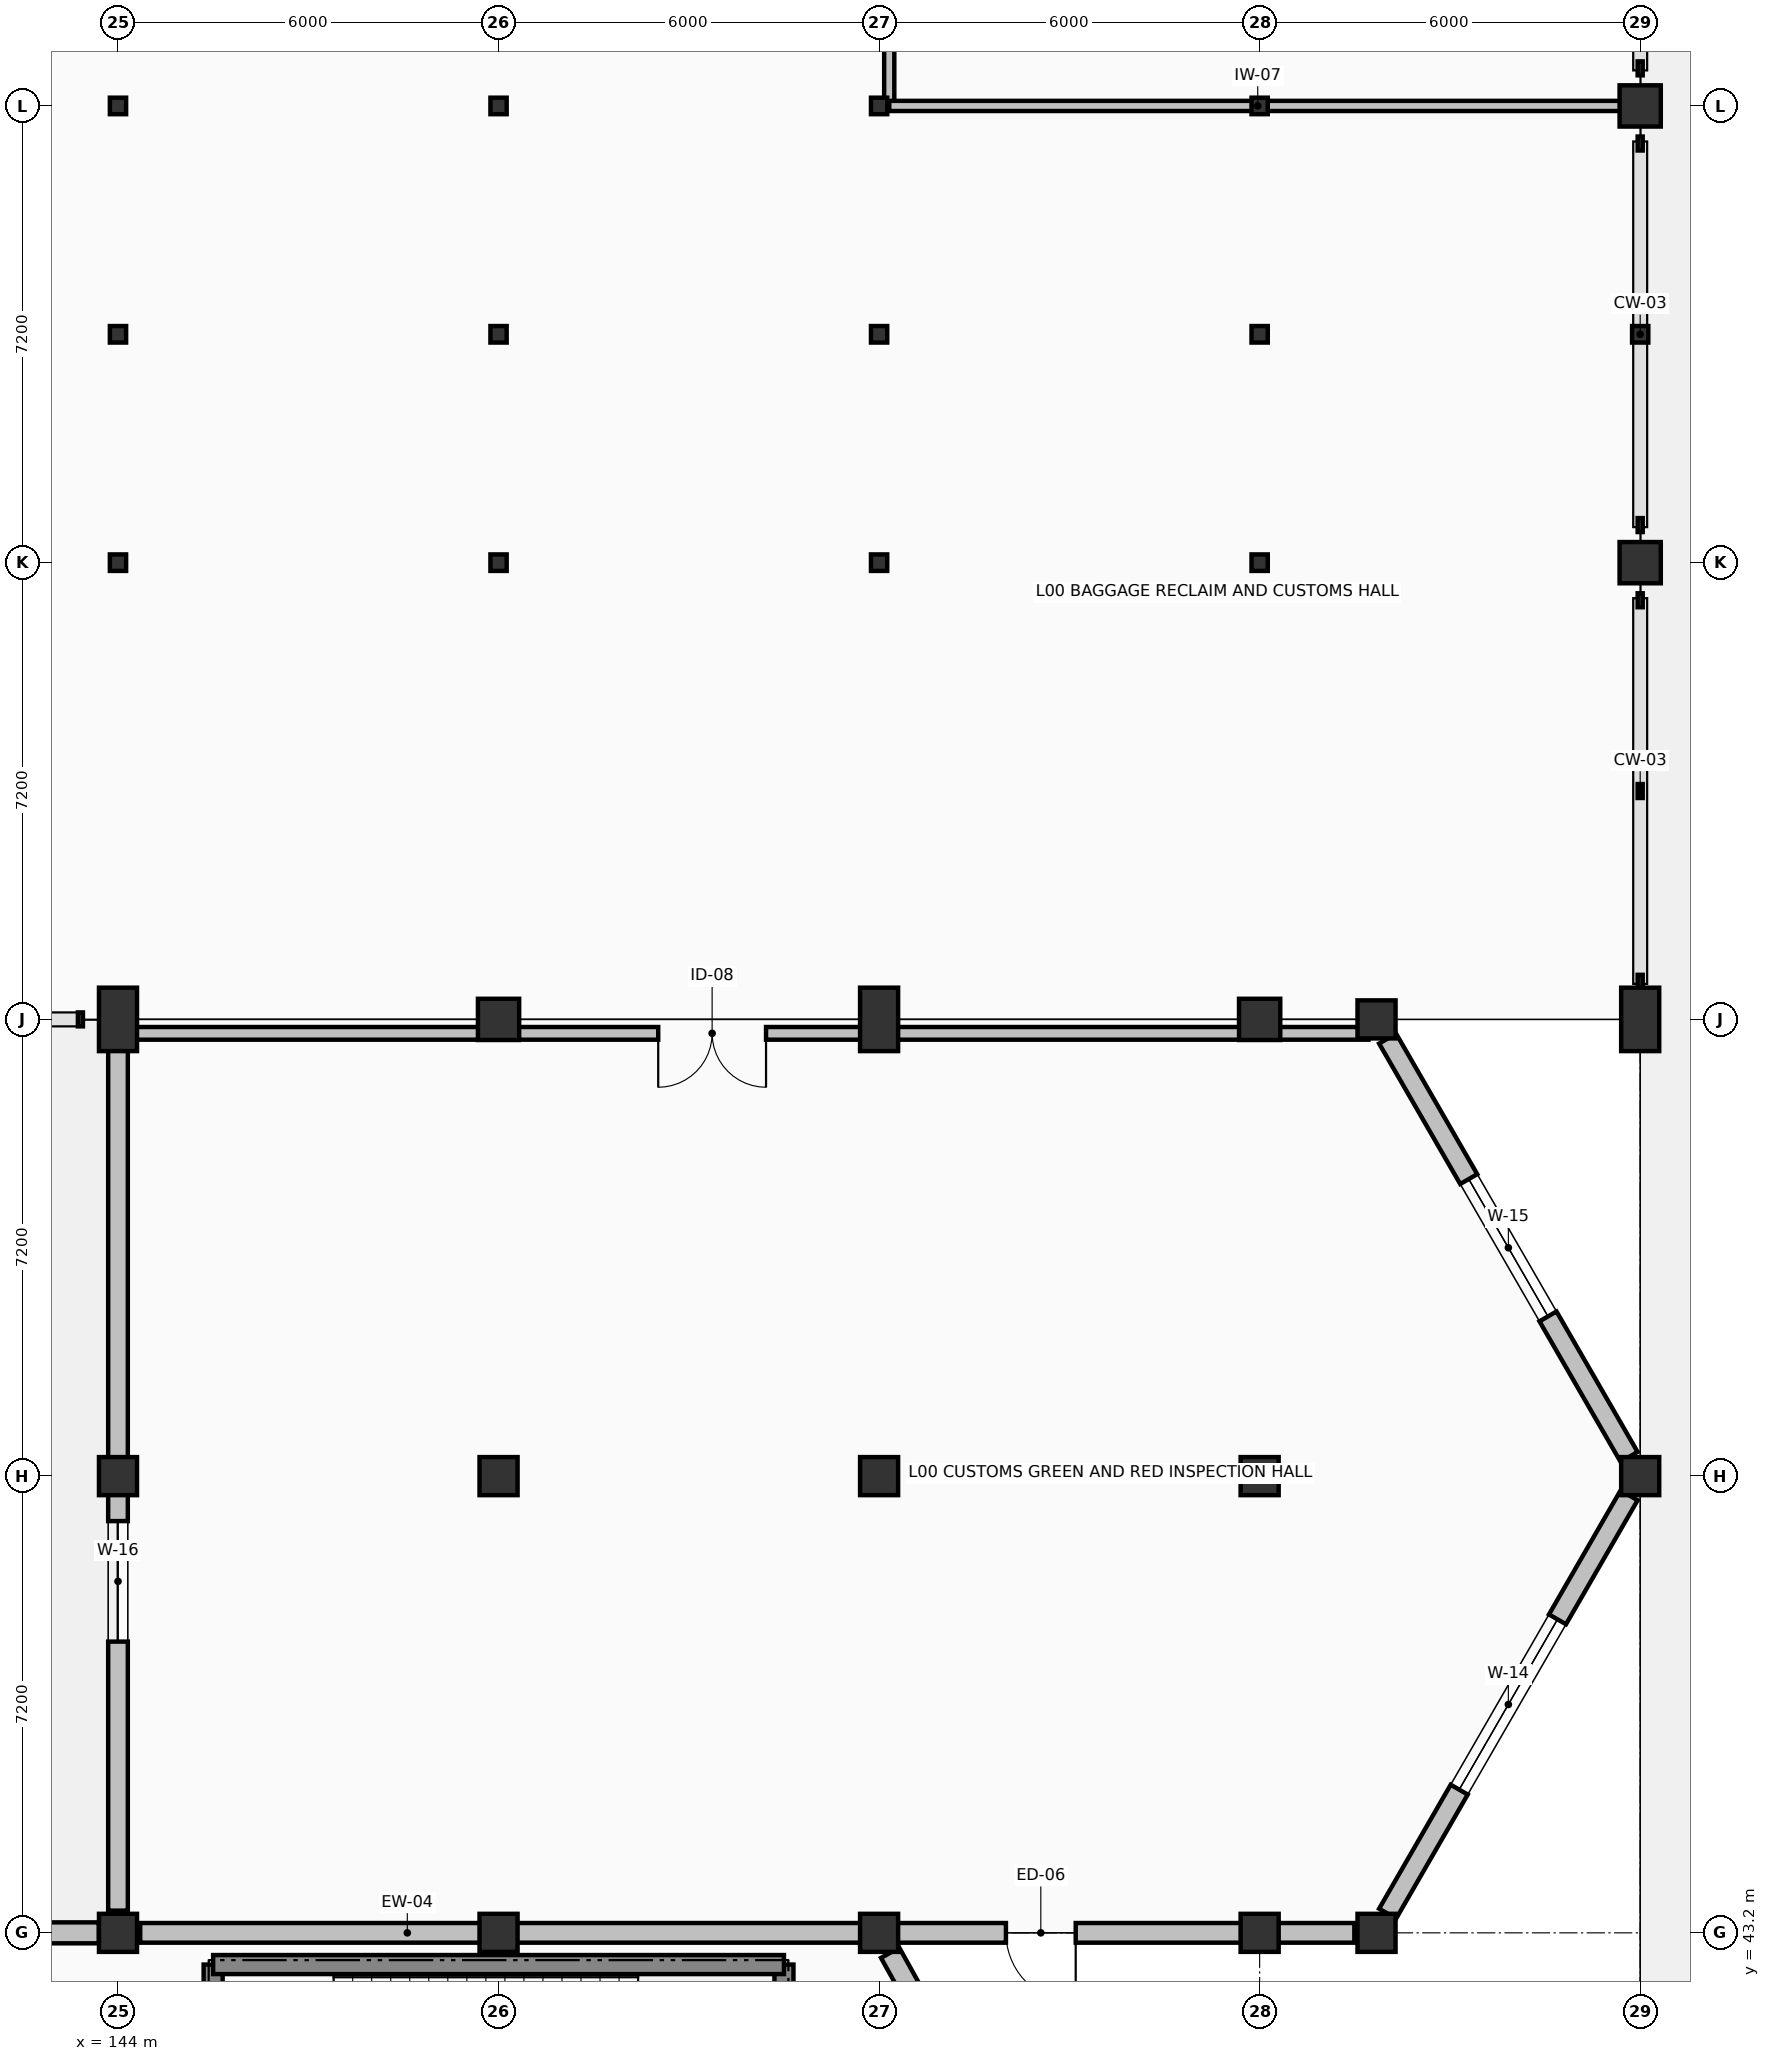
"""IFC4 building model, lengths in metres.
Left out: names, types, materials, properties, quantities, classifications, styles, units other than length and angle.
Written with IfcOpenShell. Run it as: python <this file> out.ifc"""

import sys

from ifc_helpers import new_model, si_unit, direction, frame, frame_2d, origin, origin_2d, place, context, subcontext, project, spatial, rectangle, i_section, extrude, element, fill, save


model = new_model("IFC4")
c1 = context("Model", 3, precision=1e-05, world=origin(), true_north=direction((0.0, 1.0)))
c2 = subcontext(c1, "Body", "Model", "MODEL_VIEW")
j1 = project(units=[si_unit("LENGTHUNIT", "METRE"), si_unit("PLANEANGLEUNIT", "RADIAN")], contexts=[c1])
p1 = place(None, origin())
s1 = spatial("IfcSite", under=j1, at=p1, CompositionType="ELEMENT")
p2 = place(p1, origin())
s2 = spatial("IfcBuilding", under=s1, at=p2, CompositionType="ELEMENT")
p3 = place(p2, origin())
s3 = spatial("IfcBuildingStorey", under=s2, at=p3, CompositionType="ELEMENT", Elevation=0.0)
for number, where, z_axis, x_axis in (
    (1, (145.5, 39.1, -0.32), (0.0, 0.0, 1.0), (0.0, 1.0, 0.0)),
    (2, (154.5, 39.1, -0.32), (0.0, 0.0, 1.0), (0.0, 1.0, 0.0)),
):
    element("IfcWall", number, at=place(p3, frame(where, z_axis=z_axis, x_axis=x_axis)), inside=s3, PredefinedType="SHEAR", context=c2, shape_type="SweptSolid", body=[
        extrude(rectangle(XDim=3.6, YDim=0.3, at=frame_2d((1.8, 0.0))), origin(), (0.0, 0.0, 1.0), 6.08),
    ])
p4 = place(p3, frame((144.0, 57.6, -0.32), z_axis=(0.0, 0.0, 1.0), x_axis=(1.0, 0.0, 0.0)))
e3 = element("IfcColumn", 3, at=p4, inside=s3, PredefinedType="COLUMN", context=c2, shape_type="SweptSolid", body=[
    extrude(rectangle(XDim=0.6, YDim=1.0, at=origin_2d()), origin(), (0.0, 0.0, 1.0), 6.08),
])
p5 = place(p3, frame((150.0, 57.6, -0.32), z_axis=(0.0, 0.0, 1.0), x_axis=(1.0, 0.0, 0.0)))
e4 = element("IfcColumn", 4, at=p5, inside=s3, PredefinedType="COLUMN", context=c2, shape_type="SweptSolid", body=[
    extrude(rectangle(XDim=0.65, YDim=0.65, at=origin_2d()), origin(), (0.0, 0.0, 1.0), 6.08),
])
p6 = place(p3, frame((156.0, 57.6, -0.32), z_axis=(0.0, 0.0, 1.0), x_axis=(1.0, 0.0, 0.0)))
e5 = element("IfcColumn", 5, at=p6, inside=s3, PredefinedType="COLUMN", context=c2, shape_type="SweptSolid", body=[
    extrude(rectangle(XDim=0.6, YDim=1.0, at=origin_2d()), origin(), (0.0, 0.0, 1.0), 6.08),
])
p7 = place(p3, frame((162.0, 57.6, -0.32), z_axis=(0.0, 0.0, 1.0), x_axis=(1.0, 0.0, 0.0)))
e6 = element("IfcColumn", 6, at=p7, inside=s3, PredefinedType="COLUMN", context=c2, shape_type="SweptSolid", body=[
    extrude(rectangle(XDim=0.65, YDim=0.65, at=origin_2d()), origin(), (0.0, 0.0, 1.0), 6.08),
])
p8 = place(p3, frame((168.0, 57.6, -0.32), z_axis=(0.0, 0.0, 1.0), x_axis=(1.0, 0.0, 0.0)))
e7 = element("IfcColumn", 7, at=p8, inside=s3, PredefinedType="COLUMN", context=c2, shape_type="SweptSolid", body=[
    extrude(rectangle(XDim=0.6, YDim=1.0, at=origin_2d()), origin(), (0.0, 0.0, 1.0), 6.08),
])
for number, where, z_axis, x_axis in (
    (8, (168.0, 64.8, -0.32), (0.0, 0.0, 1.0), (1.0, 0.0, 0.0)),
    (9, (168.0, 72.0, -0.32), (0.0, 0.0, 1.0), (1.0, 0.0, 0.0)),
):
    element("IfcColumn", number, at=place(p3, frame(where, z_axis=z_axis, x_axis=x_axis)), inside=s3, PredefinedType="COLUMN", context=c2, shape_type="SweptSolid", body=[
        extrude(rectangle(XDim=0.65, YDim=0.65, at=origin_2d()), origin(), (0.0, 0.0, 1.0), 6.08),
    ])
for number, where, z_axis, x_axis in (
    (10, (144.0, 43.2, -0.32), (0.0, 0.0, 1.0), (1.0, 0.0, 0.0)),
    (11, (144.0, 50.4, -0.32), (0.0, 0.0, 1.0), (1.0, 0.0, 0.0)),
    (12, (150.0, 43.2, -0.32), (0.0, 0.0, 1.0), (1.0, 0.0, 0.0)),
    (13, (150.0, 50.4, -0.32), (0.0, 0.0, 1.0), (1.0, 0.0, 0.0)),
    (14, (156.0, 43.2, -0.32), (0.0, 0.0, 1.0), (1.0, 0.0, 0.0)),
    (15, (156.0, 50.4, -0.32), (0.0, 0.0, 1.0), (1.0, 0.0, 0.0)),
    (16, (162.0, 43.2, -0.32), (0.0, 0.0, 1.0), (1.0, 0.0, 0.0)),
    (17, (162.0, 50.4, -0.32), (0.0, 0.0, 1.0), (1.0, 0.0, 0.0)),
    (18, (163.843, 43.2, -0.32), (0.0, 0.0, 1.0), (1.0, 0.0, 0.0)),
    (19, (163.843, 57.6, -0.32), (0.0, 0.0, 1.0), (1.0, 0.0, 0.0)),
    (20, (168.0, 50.4, -0.32), (0.0, 0.0, 1.0), (1.0, 0.0, 0.0)),
):
    element("IfcColumn", number, at=place(p3, frame(where, z_axis=z_axis, x_axis=x_axis)), inside=s3, PredefinedType="COLUMN", context=c2, shape_type="SweptSolid", body=[
        extrude(rectangle(XDim=0.6, YDim=0.6, at=origin_2d()), origin(), (0.0, 0.0, 1.0), 6.08),
    ])
for number, where, z_axis, x_axis in (
    (21, (144.0, 64.8, -0.32), (0.0, 0.0, 1.0), (1.0, 0.0, 0.0)),
    (22, (144.0, 68.4, -0.32), (0.0, 0.0, 1.0), (1.0, 0.0, 0.0)),
    (23, (144.0, 72.0, -0.32), (0.0, 0.0, 1.0), (1.0, 0.0, 0.0)),
    (24, (150.0, 64.8, -0.32), (0.0, 0.0, 1.0), (1.0, 0.0, 0.0)),
    (25, (150.0, 68.4, -0.32), (0.0, 0.0, 1.0), (1.0, 0.0, 0.0)),
    (26, (150.0, 72.0, -0.32), (0.0, 0.0, 1.0), (1.0, 0.0, 0.0)),
    (27, (156.0, 64.8, -0.32), (0.0, 0.0, 1.0), (1.0, 0.0, 0.0)),
    (28, (156.0, 68.4, -0.32), (0.0, 0.0, 1.0), (1.0, 0.0, 0.0)),
    (29, (156.0, 72.0, -0.32), (0.0, 0.0, 1.0), (1.0, 0.0, 0.0)),
    (30, (162.0, 64.8, -0.32), (0.0, 0.0, 1.0), (1.0, 0.0, 0.0)),
    (31, (162.0, 68.4, -0.32), (0.0, 0.0, 1.0), (1.0, 0.0, 0.0)),
    (32, (162.0, 72.0, -0.32), (0.0, 0.0, 1.0), (1.0, 0.0, 0.0)),
    (33, (168.0, 68.4, -0.32), (0.0, 0.0, 1.0), (1.0, 0.0, 0.0)),
):
    element("IfcColumn", number, at=place(p3, frame(where, z_axis=z_axis, x_axis=x_axis)), inside=s3, PredefinedType="COLUMN", context=c2, shape_type="SweptSolid", body=[
        extrude(i_section(OverallWidth=0.256, OverallDepth=0.26, WebThickness=0.01, FlangeThickness=0.017, FilletRadius=0.013, at=origin_2d()), origin(), (0.0, 0.0, 1.0), 5.82),
    ])
p9 = place(p3, frame((144.35, 43.2, 0.0), z_axis=(0.0, 0.0, 1.0), x_axis=(1.0, 0.0, 0.0)))
e34 = element("IfcWall", 34, at=p9, inside=s3, PredefinedType="SOLIDWALL", context=c2, shape_type="SweptSolid", body=[
    extrude(rectangle(XDim=19.143, YDim=0.31, at=frame_2d((9.572, 0.0))), origin(), (0.0, 0.0, 1.0), 4.89),
])
p10 = place(p9, frame((13.65, 0.0, 0.0)))
e35 = element("IfcOpeningElement", 35, at=p10, cuts=e34, PredefinedType="OPENING", context=c2, shape_type="SweptSolid", body=[
    extrude(rectangle(XDim=1.1, YDim=2.15, at=frame_2d((0.55, 1.075))), frame((0.0, 0.165, 0.0), z_axis=(0.0, -1.0, 0.0), x_axis=(1.0, 0.0, 0.0)), (0.0, 0.0, 1.0), 0.33),
])
p11 = place(p3, frame((164.018, 43.503, 0.0), z_axis=(0.0, 0.0, 1.0), x_axis=(0.499998170572, 0.866026460002, 0.0)))
e36 = element("IfcWall", 36, at=p11, inside=s3, PredefinedType="SOLIDWALL", context=c2, shape_type="SweptSolid", body=[
    extrude(rectangle(XDim=7.614, YDim=0.31, at=frame_2d((3.807, 0.0))), origin(), (0.0, 0.0, 1.0), 4.89),
])
p12 = place(p11, frame((2.257, 0.0, 1.65)))
e37 = element("IfcOpeningElement", 37, at=p12, cuts=e36, PredefinedType="OPENING", context=c2, shape_type="SweptSolid", body=[
    extrude(rectangle(XDim=3.1, YDim=0.95, at=frame_2d((1.55, 0.475))), frame((0.0, 0.165, 0.0), z_axis=(0.0, -1.0, 0.0), x_axis=(1.0, 0.0, 0.0)), (0.0, 0.0, 1.0), 0.33),
])
p13 = place(p3, frame((167.825, 50.703, 0.0), z_axis=(0.0, 0.0, 1.0), x_axis=(-0.499998170572, 0.866026460002, 0.0)))
e38 = element("IfcWall", 38, at=p13, inside=s3, PredefinedType="SOLIDWALL", context=c2, shape_type="SweptSolid", body=[
    extrude(rectangle(XDim=7.614, YDim=0.31, at=frame_2d((3.807, 0.0))), origin(), (0.0, 0.0, 1.0), 4.89),
])
p14 = place(p13, frame((2.557, 0.0, 1.65)))
e39 = element("IfcOpeningElement", 39, at=p14, cuts=e38, PredefinedType="OPENING", context=c2, shape_type="SweptSolid", body=[
    extrude(rectangle(XDim=2.5, YDim=0.9, at=frame_2d((1.25, 0.45))), frame((0.0, 0.165, 0.0), z_axis=(0.0, -1.0, 0.0), x_axis=(1.0, 0.0, 0.0)), (0.0, 0.0, 1.0), 0.33),
])
p15 = place(p3, frame((144.0, 57.25, 0.0), z_axis=(0.0, 0.0, 1.0), x_axis=(0.0, -1.0, 0.0)))
e40 = element("IfcWall", 40, at=p15, inside=s3, PredefinedType="SOLIDWALL", context=c2, shape_type="SweptSolid", body=[
    extrude(rectangle(XDim=13.7, YDim=0.31, at=frame_2d((6.85, 0.0))), origin(), (0.0, 0.0, 1.0), 4.89),
])
p16 = place(p15, frame((7.559, 0.0, 1.65)))
e41 = element("IfcOpeningElement", 41, at=p16, cuts=e40, PredefinedType="OPENING", context=c2, shape_type="SweptSolid", body=[
    extrude(rectangle(XDim=1.9, YDim=0.9, at=frame_2d((0.95, 0.45))), frame((0.0, 0.165, 0.0), z_axis=(0.0, -1.0, 0.0), x_axis=(1.0, 0.0, 0.0)), (0.0, 0.0, 1.0), 0.33),
])
p17 = place(p3, frame((159.825, 36.315, 0.0), z_axis=(0.0, 0.0, 1.0), x_axis=(-0.485651204539, 0.874152679759, 0.0)))
e42 = element("IfcWall", 42, at=p17, inside=s3, PredefinedType="SOLIDWALL", context=c2, shape_type="SweptSolid", body=[
    extrude(rectangle(XDim=7.517, YDim=0.33, at=frame_2d((3.758, 0.0))), origin(), (0.0, 0.0, 1.0), 5.13),
])
p18 = place(p3, frame((138.402, 43.2, 0.0), z_axis=(0.0, 0.0, 1.0), x_axis=(1.0, 0.0, 0.0)))
e43 = element("IfcWall", 43, at=p18, inside=s3, PredefinedType="SOLIDWALL", context=c2, shape_type="SweptSolid", body=[
    extrude(rectangle(XDim=5.296, YDim=0.33, at=frame_2d((2.648, 0.0))), origin(), (0.0, 0.0, 1.0), 5.13),
])
p19 = place(p3, frame((145.5, 42.7, -0.32), z_axis=(0.0, 0.0, 1.0), x_axis=(1.0, 0.0, 0.0)))
e44 = element("IfcWall", 44, at=p19, inside=s3, PredefinedType="SHEAR", context=c2, shape_type="SweptSolid", body=[
    extrude(rectangle(XDim=9.0, YDim=0.3, at=frame_2d((4.5, 0.0))), origin(), (0.0, 0.0, 1.0), 6.08),
])
p20 = place(p3, frame((156.16, 79.2, 0.0), z_axis=(0.0, 0.0, 1.0), x_axis=(0.0, -1.0, 0.0)))
e45 = element("IfcWall", 45, at=p20, inside=s3, PredefinedType="PARTITIONING", context=c2, shape_type="SweptSolid", body=[
    extrude(rectangle(XDim=7.2, YDim=0.16, at=frame_2d((3.6, 0.0))), origin(), (0.0, 0.0, 1.0), 4.882),
])
p21 = place(p20, frame((3.09, 0.0, 0.0)))
e46 = element("IfcOpeningElement", 46, at=p21, cuts=e45, PredefinedType="OPENING", context=c2, shape_type="SweptSolid", body=[
    extrude(rectangle(XDim=1.02, YDim=2.1, at=frame_2d((0.51, 1.05))), frame((0.0, 0.09, 0.0), z_axis=(0.0, -1.0, 0.0), x_axis=(1.0, 0.0, 0.0)), (0.0, 0.0, 1.0), 0.18),
])
p22 = place(p3, frame((156.16, 72.0, 0.0), z_axis=(0.0, 0.0, 1.0), x_axis=(1.0, 0.0, 0.0)))
e47 = element("IfcWall", 47, at=p22, inside=s3, PredefinedType="PARTITIONING", context=c2, shape_type="SweptSolid", body=[
    extrude(rectangle(XDim=11.62, YDim=0.16, at=frame_2d((5.81, 0.0))), origin(), (0.0, 0.0, 1.0), 5.033),
])
p23 = place(p3, frame((163.716, 57.38, 0.0), z_axis=(0.0, 0.0, 1.0), x_axis=(-1.0, 0.0, 0.0)))
e48 = element("IfcWall", 48, at=p23, inside=s3, PredefinedType="PARTITIONING", context=c2, shape_type="SweptSolid", body=[
    extrude(rectangle(XDim=19.496, YDim=0.2, at=frame_2d((9.748, 0.0))), origin(), (0.0, 0.0, 1.0), 4.89),
])
p24 = place(p23, frame((9.499, 0.0, 0.0)))
e49 = element("IfcOpeningElement", 49, at=p24, cuts=e48, PredefinedType="OPENING", context=c2, shape_type="SweptSolid", body=[
    extrude(rectangle(XDim=1.7, YDim=2.25, at=frame_2d((0.85, 1.125))), frame((0.0, 0.11, 0.0), z_axis=(0.0, -1.0, 0.0), x_axis=(1.0, 0.0, 0.0)), (0.0, 0.0, 1.0), 0.22),
])
p25 = place(p10, frame((1.1, 0.0, 0.0), z_axis=(0.0, 0.0, 1.0), x_axis=(-1.0, 0.0, 0.0)))
e50 = element("IfcDoor", 50, at=p25, inside=s3, OperationType="SINGLE_SWING_LEFT", PredefinedType="DOOR", context=c2, shape_type="SweptSolid", body=[
    extrude(rectangle(XDim=1.1, YDim=2.15, at=frame_2d((0.55, 1.075))), frame((0.0, 0.025, 0.0), z_axis=(0.0, -1.0, 0.0), x_axis=(1.0, 0.0, 0.0)), (0.0, 0.0, 1.0), 0.05),
])
fill(e35, e50)
p26 = place(p12, origin())
e51 = element("IfcWindow", 51, at=p26, inside=s3, PartitioningType="SINGLE_PANEL", PredefinedType="WINDOW", context=c2, shape_type="SweptSolid", body=[
    extrude(rectangle(XDim=3.1, YDim=0.95, at=frame_2d((1.55, 0.475))), frame((0.0, 0.03, 0.0), z_axis=(0.0, -1.0, 0.0), x_axis=(1.0, 0.0, 0.0)), (0.0, 0.0, 1.0), 0.06),
])
fill(e37, e51)
p27 = place(p14, origin())
e52 = element("IfcWindow", 52, at=p27, inside=s3, PartitioningType="SINGLE_PANEL", PredefinedType="WINDOW", context=c2, shape_type="SweptSolid", body=[
    extrude(rectangle(XDim=2.5, YDim=0.9, at=frame_2d((1.25, 0.45))), frame((0.0, 0.03, 0.0), z_axis=(0.0, -1.0, 0.0), x_axis=(1.0, 0.0, 0.0)), (0.0, 0.0, 1.0), 0.06),
])
fill(e39, e52)
p28 = place(p16, origin())
e53 = element("IfcWindow", 53, at=p28, inside=s3, PartitioningType="SINGLE_PANEL", PredefinedType="WINDOW", context=c2, shape_type="SweptSolid", body=[
    extrude(rectangle(XDim=1.9, YDim=0.9, at=frame_2d((0.95, 0.45))), frame((0.0, 0.03, 0.0), z_axis=(0.0, -1.0, 0.0), x_axis=(1.0, 0.0, 0.0)), (0.0, 0.0, 1.0), 0.06),
])
fill(e41, e53)
p29 = place(p24, origin())
e54 = element("IfcDoor", 54, at=p29, inside=s3, OperationType="DOUBLE_SWING_LEFT", PredefinedType="DOOR", context=c2, shape_type="SweptSolid", body=[
    extrude(rectangle(XDim=1.7, YDim=2.25, at=frame_2d((0.85, 1.125))), frame((0.0, 0.025, 0.0), z_axis=(0.0, -1.0, 0.0), x_axis=(1.0, 0.0, 0.0)), (0.0, 0.0, 1.0), 0.05),
])
fill(e49, e54)
save(model, sys.argv[1])
